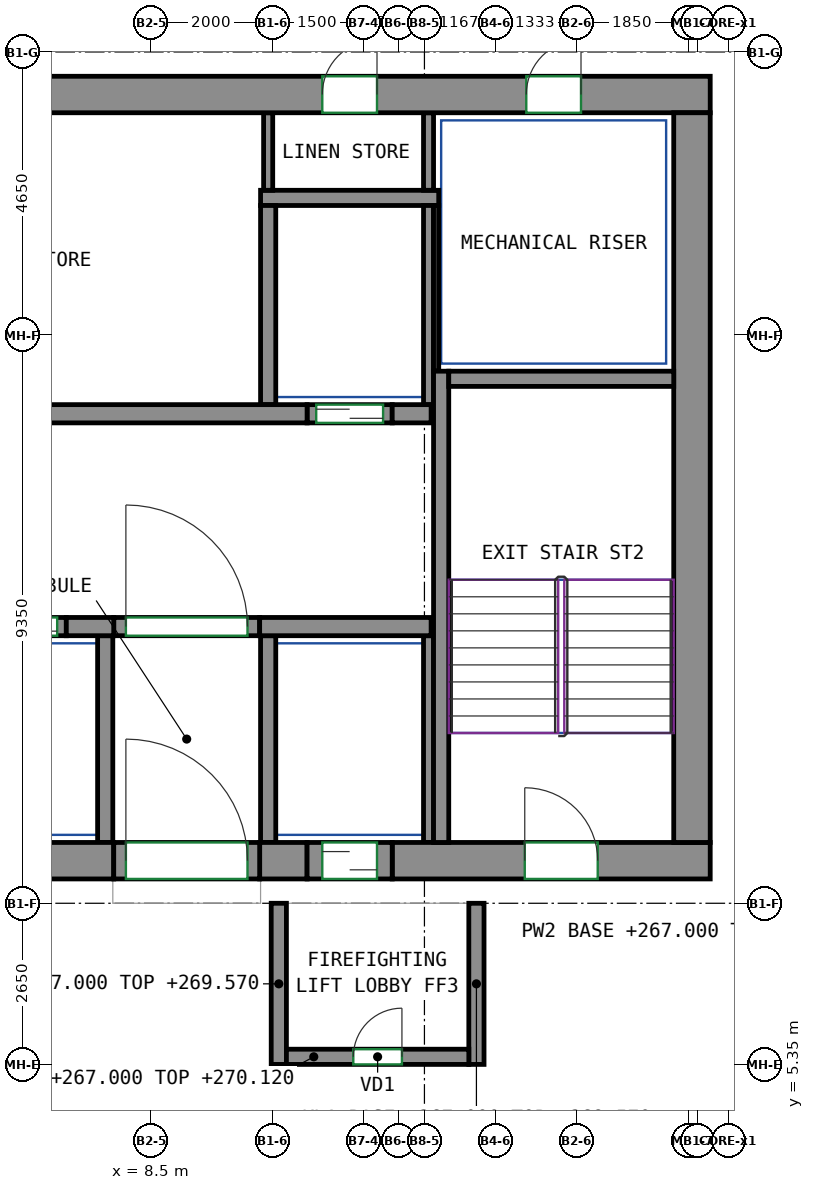
"""IFC4 building model, lengths in metres.
Left out: names, types, materials, properties, quantities, classifications, styles, units other than length and angle.
Written with IfcOpenShell. Run it as: python <this file> out.ifc"""

import sys

from ifc_helpers import new_model, si_unit, direction, frame, frame_2d, origin, place, context, subcontext, project, spatial, rectangle, extrude, source, transform, mapped, element, fill, save


model = new_model("IFC4")
c1 = context("Model", 3, precision=1e-05, world=origin(), true_north=direction((0.0, 1.0)))
c2 = subcontext(c1, "Body", "Model", "MODEL_VIEW")
j1 = project(units=[si_unit("LENGTHUNIT", "METRE"), si_unit("PLANEANGLEUNIT", "RADIAN")], contexts=[c1])
p1 = place(None, origin())
s1 = spatial("IfcSite", under=j1, at=p1, CompositionType="ELEMENT")
p2 = place(p1, origin())
s2 = spatial("IfcBuilding", under=s1, at=p2, CompositionType="ELEMENT")
p3 = place(p2, frame((0.0, 0.0, 267.0)))
s3 = spatial("IfcBuildingStorey", under=s2, at=p3, CompositionType="ELEMENT", Elevation=267.0)
m1 = source(origin(), c2, "Body", "SweptSolid", [
    extrude(rectangle(XDim=14.18, YDim=0.6, at=frame_2d((7.09, 0.0))), origin(), (0.0, 0.0, 1.0), 3.12),
])
p4 = place(p3, frame((-6.29, 8.7, 0.0), z_axis=(0.0, 0.0, 1.0), x_axis=(1.0, 0.0, 0.0)))
e1 = element("IfcWall", 1, at=p4, inside=s3, PredefinedType="SHEAR", context=c2, shape_type="MappedRepresentation", body=[
    mapped(m1, transform((0.0, 0.0, 0.0))),
])
m2 = source(origin(), c2, "Body", "SweptSolid", [
    extrude(rectangle(XDim=0.78, YDim=0.6, at=frame_2d((0.39, 0.0))), origin(), (0.0, 0.0, 1.0), 3.12),
])
p5 = place(p3, frame((10.29, 8.7, 0.0), z_axis=(0.0, 0.0, 1.0), x_axis=(1.0, 0.0, 0.0)))
e2 = element("IfcWall", 2, at=p5, inside=s3, PredefinedType="SHEAR", context=c2, shape_type="MappedRepresentation", body=[
    mapped(m2, transform((0.0, 0.0, 0.0))),
])
m3 = source(origin(), c2, "Body", "SweptSolid", [
    extrude(rectangle(XDim=5.23, YDim=0.6, at=frame_2d((2.615, 0.0))), origin(), (0.0, 0.0, 1.0), 3.12),
])
p6 = place(p3, frame((12.47, 8.7, 0.0), z_axis=(0.0, 0.0, 1.0), x_axis=(1.0, 0.0, 0.0)))
e3 = element("IfcWall", 3, at=p6, inside=s3, PredefinedType="SHEAR", context=c2, shape_type="MappedRepresentation", body=[
    mapped(m3, transform((0.0, 0.0, 0.0))),
])
p7 = place(p6, frame((2.18, 0.0, 0.0)))
e4 = element("IfcOpeningElement", 4, at=p7, cuts=e3, PredefinedType="OPENING", context=c2, shape_type="SweptSolid", body=[
    extrude(rectangle(XDim=1.2, YDim=2.1, at=frame_2d((0.6, 1.05))), frame((0.0, 0.31, 0.0), z_axis=(0.0, -1.0, 0.0), x_axis=(1.0, 0.0, 0.0)), (0.0, 0.0, 1.0), 0.62),
])
m4 = source(origin(), c2, "Body", "SweptSolid", [
    extrude(rectangle(XDim=33.3, YDim=0.6, at=frame_2d((16.65, 0.0))), origin(), (0.0, 0.0, 1.0), 3.12),
])
p8 = place(p3, frame((-15.6, 21.3, 0.0), z_axis=(0.0, 0.0, 1.0), x_axis=(1.0, 0.0, 0.0)))
e5 = element("IfcWall", 5, at=p8, inside=s3, PredefinedType="SHEAR", context=c2, shape_type="MappedRepresentation", body=[
    mapped(m4, transform((0.0, 0.0, 0.0))),
])
p9 = place(p8, frame((5.708, 0.0, 0.0)))
e6 = element("IfcOpeningElement", 6, at=p9, cuts=e5, PredefinedType="OPENING", context=c2, shape_type="SweptSolid", body=[
    extrude(rectangle(XDim=0.9, YDim=2.1, at=frame_2d((0.45, 1.05))), frame((0.0, 0.31, 0.0), z_axis=(0.0, -1.0, 0.0), x_axis=(1.0, 0.0, 0.0)), (0.0, 0.0, 1.0), 0.62),
])
p10 = place(p8, frame((10.773, 0.0, 0.0)))
e7 = element("IfcOpeningElement", 7, at=p10, cuts=e5, PredefinedType="OPENING", context=c2, shape_type="SweptSolid", body=[
    extrude(rectangle(XDim=0.9, YDim=2.1, at=frame_2d((0.45, 1.05))), frame((0.0, 0.31, 0.0), z_axis=(0.0, -1.0, 0.0), x_axis=(1.0, 0.0, 0.0)), (0.0, 0.0, 1.0), 0.62),
])
p11 = place(p8, frame((15.838, 0.0, 0.0)))
e8 = element("IfcOpeningElement", 8, at=p11, cuts=e5, PredefinedType="OPENING", context=c2, shape_type="SweptSolid", body=[
    extrude(rectangle(XDim=0.9, YDim=2.1, at=frame_2d((0.45, 1.05))), frame((0.0, 0.31, 0.0), z_axis=(0.0, -1.0, 0.0), x_axis=(1.0, 0.0, 0.0)), (0.0, 0.0, 1.0), 0.62),
])
p12 = place(p8, frame((21.493, 0.0, 0.0)))
e9 = element("IfcOpeningElement", 9, at=p12, cuts=e5, PredefinedType="OPENING", context=c2, shape_type="SweptSolid", body=[
    extrude(rectangle(XDim=0.9, YDim=2.1, at=frame_2d((0.45, 1.05))), frame((0.0, 0.31, 0.0), z_axis=(0.0, -1.0, 0.0), x_axis=(1.0, 0.0, 0.0)), (0.0, 0.0, 1.0), 0.62),
])
p13 = place(p8, frame((26.92, 0.0, 0.0)))
e10 = element("IfcOpeningElement", 10, at=p13, cuts=e5, PredefinedType="OPENING", context=c2, shape_type="SweptSolid", body=[
    extrude(rectangle(XDim=0.9, YDim=2.1, at=frame_2d((0.45, 1.05))), frame((0.0, 0.31, 0.0), z_axis=(0.0, -1.0, 0.0), x_axis=(1.0, 0.0, 0.0)), (0.0, 0.0, 1.0), 0.62),
])
p14 = place(p8, frame((2.125, 0.0, 0.0)))
e11 = element("IfcOpeningElement", 11, at=p14, cuts=e5, PredefinedType="OPENING", context=c2, shape_type="SweptSolid", body=[
    extrude(rectangle(XDim=0.9, YDim=2.1, at=frame_2d((0.45, 1.05))), frame((0.0, 0.31, 0.0), z_axis=(0.0, -1.0, 0.0), x_axis=(1.0, 0.0, 0.0)), (0.0, 0.0, 1.0), 0.62),
])
p15 = place(p8, frame((30.275, 0.0, 0.0)))
e12 = element("IfcOpeningElement", 12, at=p15, cuts=e5, PredefinedType="OPENING", context=c2, shape_type="SweptSolid", body=[
    extrude(rectangle(XDim=0.9, YDim=2.1, at=frame_2d((0.45, 1.05))), frame((0.0, 0.31, 0.0), z_axis=(0.0, -1.0, 0.0), x_axis=(1.0, 0.0, 0.0)), (0.0, 0.0, 1.0), 0.62),
])
m5 = source(origin(), c2, "Body", "SweptSolid", [
    extrude(rectangle(XDim=12.0, YDim=0.6, at=frame_2d((6.0, 0.0))), origin(), (0.0, 0.0, 1.0), 3.12),
])
p16 = place(p3, frame((17.4, 9.0, 0.0), z_axis=(0.0, 0.0, 1.0), x_axis=(0.0, 1.0, 0.0)))
e13 = element("IfcWall", 13, at=p16, inside=s3, PredefinedType="SHEAR", context=c2, shape_type="MappedRepresentation", body=[
    mapped(m5, transform((0.0, 0.0, 0.0))),
])
m6 = source(origin(), c2, "Body", "SweptSolid", [
    extrude(rectangle(XDim=7.75, YDim=0.25, at=frame_2d((3.875, 0.0))), origin(), (0.0, 0.0, 1.0), 3.12),
])
p17 = place(p3, frame((13.275, 9.0, 0.0), z_axis=(0.0, 0.0, 1.0), x_axis=(0.0, 1.0, 0.0)))
e14 = element("IfcWall", 14, at=p17, inside=s3, PredefinedType="SHEAR", context=c2, shape_type="MappedRepresentation", body=[
    mapped(m6, transform((0.0, 0.0, 0.0))),
])
m7 = source(origin(), c2, "Body", "SweptSolid", [
    extrude(rectangle(XDim=3.7, YDim=0.25, at=frame_2d((1.85, 0.0))), origin(), (0.0, 0.0, 1.0), 3.12),
])
p18 = place(p3, frame((13.4, 16.625, 0.0), z_axis=(0.0, 0.0, 1.0), x_axis=(1.0, 0.0, 0.0)))
e15 = element("IfcWall", 15, at=p18, inside=s3, PredefinedType="SHEAR", context=c2, shape_type="MappedRepresentation", body=[
    mapped(m7, transform((0.0, 0.0, 0.0))),
])
m8 = source(origin(), c2, "Body", "SweptSolid", [
    extrude(rectangle(XDim=0.78, YDim=0.3, at=frame_2d((0.39, 0.0))), origin(), (0.0, 0.0, 1.0), 3.12),
])
p19 = place(p3, frame((7.11, 12.55, 0.0), z_axis=(0.0, 0.0, 1.0), x_axis=(1.0, 0.0, 0.0)))
e16 = element("IfcWall", 16, at=p19, inside=s3, PredefinedType="SHEAR", context=c2, shape_type="MappedRepresentation", body=[
    mapped(m8, transform((0.0, 0.0, 0.0))),
])
m9 = source(origin(), c2, "Body", "SweptSolid", [
    extrude(rectangle(XDim=2.82, YDim=0.3, at=frame_2d((1.41, 0.0))), origin(), (0.0, 0.0, 1.0), 3.12),
])
p20 = place(p3, frame((10.29, 12.55, 0.0), z_axis=(0.0, 0.0, 1.0), x_axis=(1.0, 0.0, 0.0)))
e17 = element("IfcWall", 17, at=p20, inside=s3, PredefinedType="SHEAR", context=c2, shape_type="MappedRepresentation", body=[
    mapped(m9, transform((0.0, 0.0, 0.0))),
])
m10 = source(origin(), c2, "Body", "SweptSolid", [
    extrude(rectangle(XDim=22.08, YDim=0.3, at=frame_2d((11.04, 0.0))), origin(), (0.0, 0.0, 1.0), 3.12),
])
p21 = place(p3, frame((-11.01, 16.05, 0.0), z_axis=(0.0, 0.0, 1.0), x_axis=(1.0, 0.0, 0.0)))
e18 = element("IfcWall", 18, at=p21, inside=s3, PredefinedType="SHEAR", context=c2, shape_type="MappedRepresentation", body=[
    mapped(m10, transform((0.0, 0.0, 0.0))),
])
m11 = source(origin(), c2, "Body", "SweptSolid", [
    extrude(rectangle(XDim=0.64, YDim=0.3, at=frame_2d((0.32, 0.0))), origin(), (0.0, 0.0, 1.0), 3.12),
])
p22 = place(p3, frame((12.47, 16.05, 0.0), z_axis=(0.0, 0.0, 1.0), x_axis=(1.0, 0.0, 0.0)))
e19 = element("IfcWall", 19, at=p22, inside=s3, PredefinedType="SHEAR", context=c2, shape_type="MappedRepresentation", body=[
    mapped(m11, transform((0.0, 0.0, 0.0))),
])
m12 = source(origin(), c2, "Body", "SweptSolid", [
    extrude(rectangle(XDim=1.4, YDim=0.3, at=frame_2d((0.7, 0.0))), origin(), (0.0, 0.0, 1.0), 3.12),
])
p23 = place(p3, frame((5.71, 12.55, 0.0), z_axis=(0.0, 0.0, 1.0), x_axis=(1.0, 0.0, 0.0)))
e20 = element("IfcWall", 20, at=p23, inside=s3, PredefinedType="PARTITIONING", context=c2, shape_type="MappedRepresentation", body=[
    mapped(m12, transform((0.0, 0.0, 0.0))),
])
p24 = place(p23, frame((0.15, 0.0, 0.0)))
e21 = element("IfcOpeningElement", 21, at=p24, cuts=e20, PredefinedType="OPENING", context=c2, shape_type="SweptSolid", body=[
    extrude(rectangle(XDim=1.1, YDim=2.1, at=frame_2d((0.55, 1.05))), frame((0.0, 0.16, 0.0), z_axis=(0.0, -1.0, 0.0), x_axis=(1.0, 0.0, 0.0)), (0.0, 0.0, 1.0), 0.32),
])
m13 = source(origin(), c2, "Body", "SweptSolid", [
    extrude(rectangle(XDim=1.4, YDim=0.3, at=frame_2d((0.7, 0.0))), origin(), (0.0, 0.0, 1.0), 3.12),
])
p25 = place(p3, frame((11.07, 16.05, 0.0), z_axis=(0.0, 0.0, 1.0), x_axis=(1.0, 0.0, 0.0)))
e22 = element("IfcWall", 22, at=p25, inside=s3, PredefinedType="PARTITIONING", context=c2, shape_type="MappedRepresentation", body=[
    mapped(m13, transform((0.0, 0.0, 0.0))),
])
p26 = place(p25, frame((0.15, 0.0, 0.0)))
e23 = element("IfcOpeningElement", 23, at=p26, cuts=e22, PredefinedType="OPENING", context=c2, shape_type="SweptSolid", body=[
    extrude(rectangle(XDim=1.1, YDim=2.1, at=frame_2d((0.55, 1.05))), frame((0.0, 0.16, 0.0), z_axis=(0.0, -1.0, 0.0), x_axis=(1.0, 0.0, 0.0)), (0.0, 0.0, 1.0), 0.32),
])
m14 = source(origin(), c2, "Body", "SweptSolid", [
    extrude(rectangle(XDim=2.4, YDim=0.3, at=frame_2d((1.2, 0.0))), origin(), (0.0, 0.0, 1.0), 3.12),
])
p27 = place(p3, frame((7.89, 12.55, 0.0), z_axis=(0.0, 0.0, 1.0), x_axis=(1.0, 0.0, 0.0)))
e24 = element("IfcWall", 24, at=p27, inside=s3, PredefinedType="PARTITIONING", context=c2, shape_type="MappedRepresentation", body=[
    mapped(m14, transform((0.0, 0.0, 0.0))),
])
p28 = place(p27, frame((0.2, 0.0, 0.0)))
e25 = element("IfcOpeningElement", 25, at=p28, cuts=e24, PredefinedType="OPENING", context=c2, shape_type="SweptSolid", body=[
    extrude(rectangle(XDim=2.0, YDim=2.1, at=frame_2d((1.0, 1.05))), frame((0.0, 0.16, 0.0), z_axis=(0.0, -1.0, 0.0), x_axis=(1.0, 0.0, 0.0)), (0.0, 0.0, 1.0), 0.32),
])
m15 = source(origin(), c2, "Body", "SweptSolid", [
    extrude(rectangle(XDim=2.65, YDim=0.25, at=frame_2d((1.325, 0.0))), origin(), (0.0, 0.0, 1.0), 2.57),
])
for number, where, z_axis, x_axis in (
    (26, (10.605, 5.35, 0.0), (0.0, 0.0, 1.0), (0.0, 1.0, 0.0)),
    (27, (13.855, 5.35, 0.0), (0.0, 0.0, 1.0), (0.0, 1.0, 0.0)),
):
    element("IfcWall", number, at=place(p3, frame(where, z_axis=z_axis, x_axis=x_axis)), inside=s3, PredefinedType="PARTITIONING", context=c2, shape_type="MappedRepresentation", body=[
        mapped(m15, transform((0.0, 0.0, 0.0))),
    ])
m16 = source(origin(), c2, "Body", "SweptSolid", [
    extrude(rectangle(XDim=3.0, YDim=0.25, at=frame_2d((1.5, 0.0))), origin(), (0.0, 0.0, 1.0), 3.12),
])
p29 = place(p3, frame((10.73, 5.475, 0.0), z_axis=(0.0, 0.0, 1.0), x_axis=(1.0, 0.0, 0.0)))
e28 = element("IfcWall", 28, at=p29, inside=s3, PredefinedType="PARTITIONING", context=c2, shape_type="MappedRepresentation", body=[
    mapped(m16, transform((0.0, 0.0, 0.0))),
])
p30 = place(p29, frame((1.1, 0.0, 0.0)))
e29 = element("IfcOpeningElement", 29, at=p30, cuts=e28, PredefinedType="OPENING", context=c2, shape_type="SweptSolid", body=[
    extrude(rectangle(XDim=0.8, YDim=2.0, at=frame_2d((0.4, 1.0))), frame((0.0, 0.135, 0.0), z_axis=(0.0, -1.0, 0.0), x_axis=(1.0, 0.0, 0.0)), (0.0, 0.0, 1.0), 0.27),
])
m17 = source(origin(), c2, "Body", "SweptSolid", [
    extrude(rectangle(XDim=2.93, YDim=0.25, at=frame_2d((1.465, 0.0))), origin(), (0.0, 0.0, 1.0), 3.12),
])
p31 = place(p3, frame((10.305, 19.6, 0.0), z_axis=(0.0, 0.0, 1.0), x_axis=(1.0, 0.0, 0.0)))
e30 = element("IfcWall", 30, at=p31, inside=s3, PredefinedType="PARTITIONING", context=c2, shape_type="MappedRepresentation", body=[
    mapped(m17, transform((0.0, 0.0, 0.0))),
])
m18 = source(origin(), c2, "Body", "SweptSolid", [
    extrude(rectangle(XDim=3.275, YDim=0.165, at=frame_2d((1.638, 0.0))), origin(), (0.0, 0.0, 1.0), 3.12),
])
p32 = place(p3, frame((13.067, 16.2, 0.0), z_axis=(0.0, 0.0, 1.0), x_axis=(0.0, 1.0, 0.0)))
e31 = element("IfcWall", 31, at=p32, inside=s3, PredefinedType="PARTITIONING", context=c2, shape_type="MappedRepresentation", body=[
    mapped(m18, transform((0.0, 0.0, 0.0))),
])
m19 = source(origin(), c2, "Body", "SweptSolid", [
    extrude(rectangle(XDim=1.275, YDim=0.165, at=frame_2d((0.637, 0.0))), origin(), (0.0, 0.0, 1.0), 3.12),
])
p33 = place(p3, frame((13.067, 19.725, 0.0), z_axis=(0.0, 0.0, 1.0), x_axis=(0.0, 1.0, 0.0)))
e32 = element("IfcWall", 32, at=p33, inside=s3, PredefinedType="PARTITIONING", context=c2, shape_type="MappedRepresentation", body=[
    mapped(m19, transform((0.0, 0.0, 0.0))),
])
m20 = source(origin(), c2, "Body", "SweptSolid", [
    extrude(rectangle(XDim=3.275, YDim=0.25, at=frame_2d((1.638, 0.0))), origin(), (0.0, 0.0, 1.0), 3.12),
])
p34 = place(p3, frame((10.43, 16.2, 0.0), z_axis=(0.0, 0.0, 1.0), x_axis=(0.0, 1.0, 0.0)))
e33 = element("IfcWall", 33, at=p34, inside=s3, PredefinedType="PARTITIONING", context=c2, shape_type="MappedRepresentation", body=[
    mapped(m20, transform((0.0, 0.0, 0.0))),
])
m21 = source(origin(), c2, "Body", "SweptSolid", [
    extrude(rectangle(XDim=2.725, YDim=0.085, at=frame_2d((1.363, 0.0))), origin(), (0.0, 0.0, 1.0), 3.12),
])
p35 = place(p3, frame((13.192, 16.75, 0.0), z_axis=(0.0, 0.0, 1.0), x_axis=(0.0, 1.0, 0.0)))
e34 = element("IfcWall", 34, at=p35, inside=s3, PredefinedType="PARTITIONING", context=c2, shape_type="MappedRepresentation", body=[
    mapped(m21, transform((0.0, 0.0, 0.0))),
])
m22 = source(origin(), c2, "Body", "SweptSolid", [
    extrude(rectangle(XDim=3.4, YDim=0.25, at=frame_2d((1.7, 0.0))), origin(), (0.0, 0.0, 1.0), 3.12),
])
p36 = place(p3, frame((10.43, 9.0, 0.0), z_axis=(0.0, 0.0, 1.0), x_axis=(0.0, 1.0, 0.0)))
e35 = element("IfcWall", 35, at=p36, inside=s3, PredefinedType="PARTITIONING", context=c2, shape_type="MappedRepresentation", body=[
    mapped(m22, transform((0.0, 0.0, 0.0))),
])
m23 = source(origin(), c2, "Body", "SweptSolid", [
    extrude(rectangle(XDim=3.4, YDim=0.165, at=frame_2d((1.7, 0.0))), origin(), (0.0, 0.0, 1.0), 3.12),
])
p37 = place(p3, frame((13.067, 9.0, 0.0), z_axis=(0.0, 0.0, 1.0), x_axis=(0.0, 1.0, 0.0)))
e36 = element("IfcWall", 36, at=p37, inside=s3, PredefinedType="PARTITIONING", context=c2, shape_type="MappedRepresentation", body=[
    mapped(m23, transform((0.0, 0.0, 0.0))),
])
p38 = place(p3, frame((7.75, 9.0, 0.0), z_axis=(0.0, 0.0, 1.0), x_axis=(0.0, 1.0, 0.0)))
e37 = element("IfcWall", 37, at=p38, inside=s3, PredefinedType="PARTITIONING", context=c2, shape_type="MappedRepresentation", body=[
    mapped(m22, transform((0.0, 0.0, 0.0))),
])
m24 = source(origin(), c2, "Body", "SweptSolid", [
    extrude(rectangle(XDim=1.275, YDim=0.15, at=frame_2d((0.637, 0.0))), origin(), (0.0, 0.0, 1.0), 3.12),
])
p39 = place(p3, frame((10.43, 19.725, 0.0), z_axis=(0.0, 0.0, 1.0), x_axis=(0.0, 1.0, 0.0)))
e38 = element("IfcWall", 38, at=p39, inside=s3, PredefinedType="PARTITIONING", context=c2, shape_type="MappedRepresentation", body=[
    mapped(m24, transform((0.0, 0.0, 0.0))),
])
m25 = source(origin(), c2, "Body", "SweptSolid", [
    extrude(rectangle(XDim=2.4, YDim=0.6, at=frame_2d((1.2, 0.0))), origin(), (0.0, 0.0, 1.0), 2.7),
])
p40 = place(p3, frame((7.89, 8.7, 0.0), z_axis=(0.0, 0.0, 1.0), x_axis=(1.0, 0.0, 0.0)))
e39 = element("IfcWall", 39, at=p40, inside=s3, PredefinedType="PARTITIONING", context=c2, shape_type="MappedRepresentation", body=[
    mapped(m25, transform((0.0, 0.0, 0.0))),
])
p41 = place(p40, frame((0.2, 0.0, 0.0)))
e40 = element("IfcOpeningElement", 40, at=p41, cuts=e39, PredefinedType="OPENING", context=c2, shape_type="SweptSolid", body=[
    extrude(rectangle(XDim=2.0, YDim=2.1, at=frame_2d((1.0, 1.05))), frame((0.0, 0.31, 0.0), z_axis=(0.0, -1.0, 0.0), x_axis=(1.0, 0.0, 0.0)), (0.0, 0.0, 1.0), 0.62),
])
m26 = source(origin(), c2, "Body", "SweptSolid", [
    extrude(rectangle(XDim=1.4, YDim=0.6, at=frame_2d((0.7, 0.0))), origin(), (0.0, 0.0, 1.0), 2.7),
])
p42 = place(p3, frame((11.07, 8.7, 0.0), z_axis=(0.0, 0.0, 1.0), x_axis=(1.0, 0.0, 0.0)))
e41 = element("IfcWall", 41, at=p42, inside=s3, PredefinedType="PARTITIONING", context=c2, shape_type="MappedRepresentation", body=[
    mapped(m26, transform((0.0, 0.0, 0.0))),
])
p43 = place(p42, frame((0.25, 0.0, 0.0)))
e42 = element("IfcOpeningElement", 42, at=p43, cuts=e41, PredefinedType="OPENING", context=c2, shape_type="SweptSolid", body=[
    extrude(rectangle(XDim=0.9, YDim=2.1, at=frame_2d((0.45, 1.05))), frame((0.0, 0.31, 0.0), z_axis=(0.0, -1.0, 0.0), x_axis=(1.0, 0.0, 0.0)), (0.0, 0.0, 1.0), 0.62),
])
p44 = place(p28, origin())
e43 = element("IfcDoor", 43, at=p44, inside=s3, OperationType="DOUBLE_DOOR_SINGLE_SWING", PredefinedType="DOOR", context=c2, shape_type="SweptSolid", body=[
    extrude(rectangle(XDim=2.0, YDim=2.1, at=frame_2d((1.0, 1.05))), frame((0.0, 0.025, 0.0), z_axis=(0.0, -1.0, 0.0), x_axis=(1.0, 0.0, 0.0)), (0.0, 0.0, 1.0), 0.05),
])
fill(e25, e43)
p45 = place(p41, origin())
e44 = element("IfcDoor", 44, at=p45, inside=s3, OperationType="DOUBLE_DOOR_SINGLE_SWING", PredefinedType="DOOR", context=c2, shape_type="SweptSolid", body=[
    extrude(rectangle(XDim=2.0, YDim=2.1, at=frame_2d((1.0, 1.05))), frame((0.0, 0.205, 0.0), z_axis=(0.0, -1.0, 0.0), x_axis=(1.0, 0.0, 0.0)), (0.0, 0.0, 1.0), 0.05),
])
fill(e40, e44)
p46 = place(p30, origin())
e45 = element("IfcDoor", 45, at=p46, inside=s3, OperationType="SINGLE_SWING_RIGHT", PredefinedType="DOOR", context=c2, shape_type="SweptSolid", body=[
    extrude(rectangle(XDim=0.8, YDim=2.0, at=frame_2d((0.4, 1.0))), frame((0.0, 0.025, 0.0), z_axis=(0.0, -1.0, 0.0), x_axis=(1.0, 0.0, 0.0)), (0.0, 0.0, 1.0), 0.05),
])
fill(e29, e45)
p47 = place(p43, origin())
e46 = element("IfcDoor", 46, at=p47, inside=s3, OperationType="SLIDING_TO_LEFT", PredefinedType="DOOR", context=c2, shape_type="SweptSolid", body=[
    extrude(rectangle(XDim=0.9, YDim=2.1, at=frame_2d((0.45, 1.05))), frame((0.0, 0.205, 0.0), z_axis=(0.0, -1.0, 0.0), x_axis=(1.0, 0.0, 0.0)), (0.0, 0.0, 1.0), 0.05),
])
fill(e42, e46)
p48 = place(p24, origin())
e47 = element("IfcDoor", 47, at=p48, inside=s3, OperationType="DOUBLE_DOOR_SLIDING", PredefinedType="DOOR", context=c2, shape_type="SweptSolid", body=[
    extrude(rectangle(XDim=1.1, YDim=2.1, at=frame_2d((0.55, 1.05))), frame((0.0, 0.025, 0.0), z_axis=(0.0, -1.0, 0.0), x_axis=(1.0, 0.0, 0.0)), (0.0, 0.0, 1.0), 0.05),
])
fill(e21, e47)
p49 = place(p26, origin())
e48 = element("IfcDoor", 48, at=p49, inside=s3, OperationType="DOUBLE_DOOR_SLIDING", PredefinedType="DOOR", context=c2, shape_type="SweptSolid", body=[
    extrude(rectangle(XDim=1.1, YDim=2.1, at=frame_2d((0.55, 1.05))), frame((0.0, 0.025, 0.0), z_axis=(0.0, -1.0, 0.0), x_axis=(1.0, 0.0, 0.0)), (0.0, 0.0, 1.0), 0.05),
])
fill(e23, e48)
p50 = place(p13, origin())
e49 = element("IfcDoor", 49, at=p50, inside=s3, OperationType="SINGLE_SWING_RIGHT", PredefinedType="DOOR", context=c2, shape_type="SweptSolid", body=[
    extrude(rectangle(XDim=0.9, YDim=2.1, at=frame_2d((0.45, 1.05))), frame((0.0, -0.155, 0.0), z_axis=(0.0, -1.0, 0.0), x_axis=(1.0, 0.0, 0.0)), (0.0, 0.0, 1.0), 0.05),
])
fill(e10, e49)
p51 = place(p15, origin())
e50 = element("IfcDoor", 50, at=p51, inside=s3, OperationType="SINGLE_SWING_RIGHT", PredefinedType="DOOR", context=c2, shape_type="SweptSolid", body=[
    extrude(rectangle(XDim=0.9, YDim=2.1, at=frame_2d((0.45, 1.05))), frame((0.0, -0.155, 0.0), z_axis=(0.0, -1.0, 0.0), x_axis=(1.0, 0.0, 0.0)), (0.0, 0.0, 1.0), 0.05),
])
fill(e12, e50)
p52 = place(p7, origin())
e51 = element("IfcDoor", 51, at=p52, inside=s3, OperationType="DOUBLE_DOOR_SINGLE_SWING", PredefinedType="DOOR", context=c2, shape_type="SweptSolid", body=[
    extrude(rectangle(XDim=1.2, YDim=2.1, at=frame_2d((0.6, 1.05))), frame((0.0, 0.205, 0.0), z_axis=(0.0, -1.0, 0.0), x_axis=(1.0, 0.0, 0.0)), (0.0, 0.0, 1.0), 0.05),
])
fill(e4, e51)
save(model, sys.argv[1])
